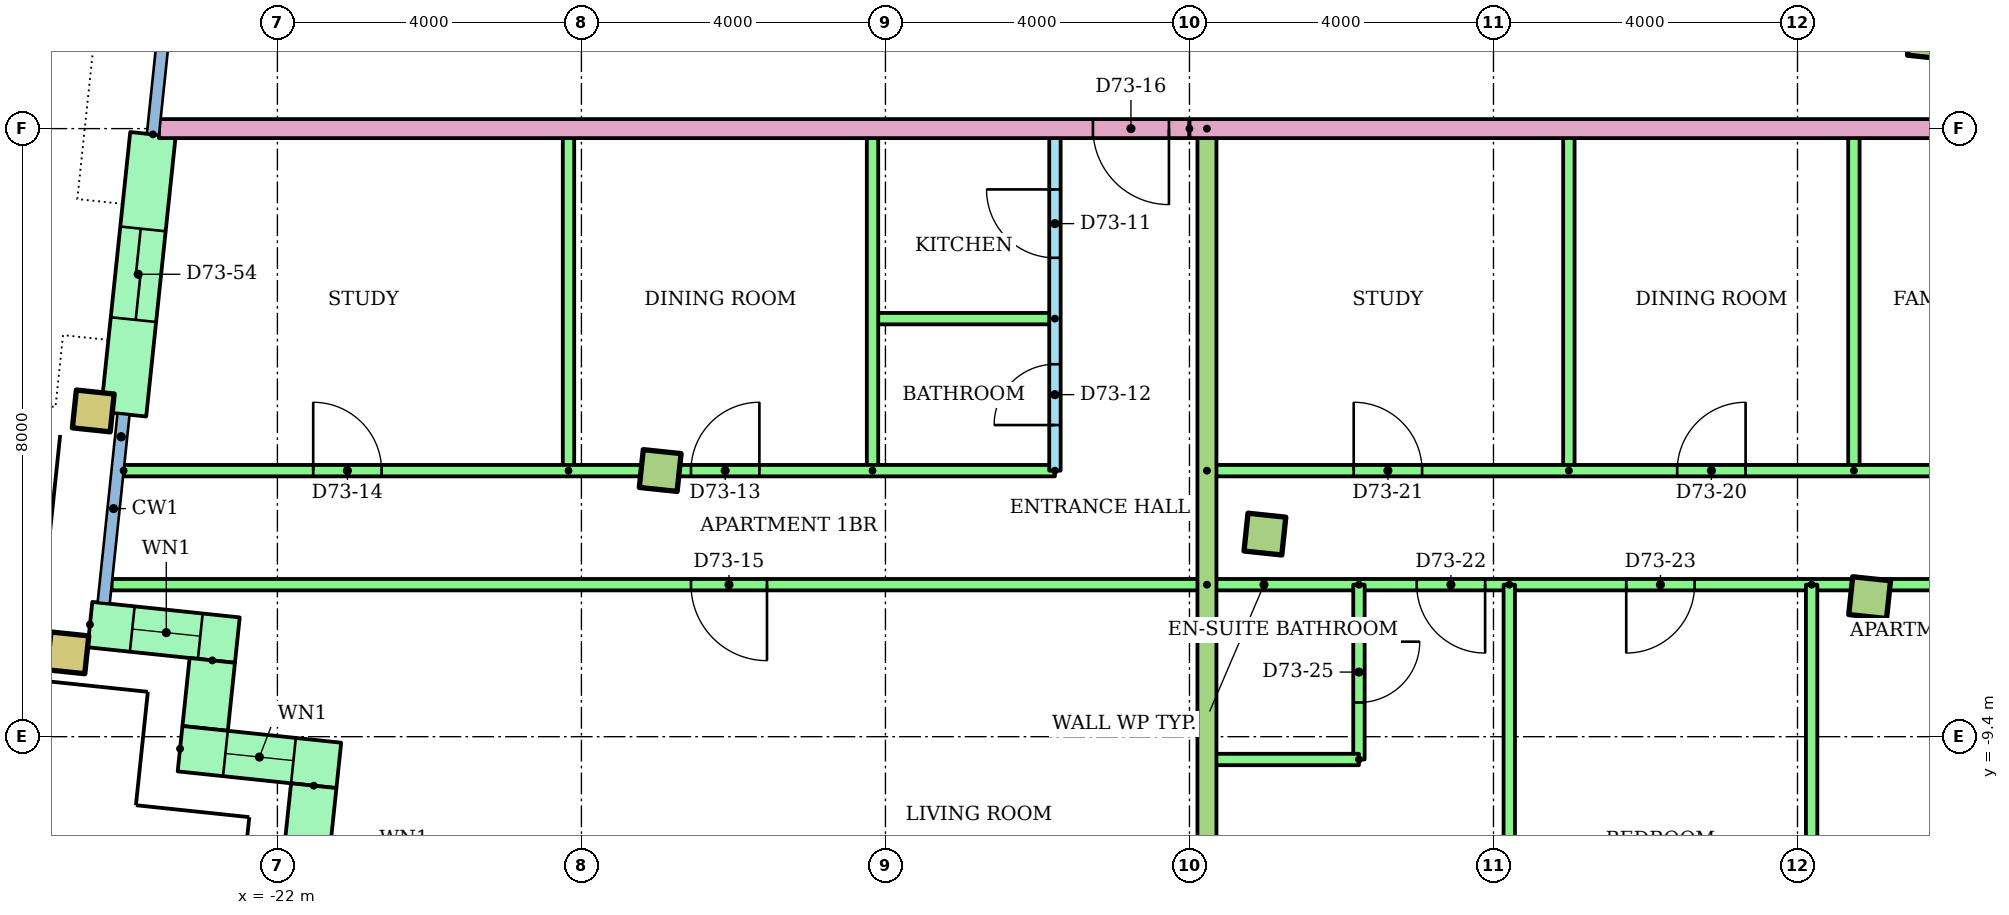
"""IFC4 building model, lengths in metres.
Left out: names, types, materials, properties, quantities, classifications, styles, units other than length and angle.
Written with IfcOpenShell. Run it as: python <this file> out.ifc"""

import sys

from ifc_helpers import new_model, si_unit, direction, frame, frame_2d, origin, origin_2d, place, context, subcontext, project, spatial, rectangle, hollow_rectangle, extrude, element, fill, save


model = new_model("IFC4")
c1 = context("Model", 3, precision=1e-05, world=origin(), true_north=direction((0.0, 1.0)))
c2 = subcontext(c1, "Body", "Model", "MODEL_VIEW")
j1 = project(units=[si_unit("LENGTHUNIT", "METRE"), si_unit("PLANEANGLEUNIT", "RADIAN")], contexts=[c1])
p1 = place(None, origin())
s1 = spatial("IfcSite", under=j1, at=p1, CompositionType="ELEMENT")
p2 = place(p1, origin())
s2 = spatial("IfcBuilding", under=s1, at=p2, CompositionType="ELEMENT")
p3 = place(p2, frame((0.0, 0.0, 278.7)))
s3 = spatial("IfcBuildingStorey", under=s2, at=p3, CompositionType="ELEMENT", Elevation=278.7)
for number, where, z_axis, x_axis in (
    (1, (-24.757, -8.297, 0.0), (0.0, 0.0, 1.0), (0.995, -0.105, 0.0)),
    (2, (-24.423, -5.115, 0.0), (0.0, 0.0, 1.0), (0.995, -0.105, 0.0)),
):
    element("IfcColumn", number, at=place(p3, frame(where, z_axis=z_axis, x_axis=x_axis)), inside=s3, PredefinedType="COLUMN", context=c2, shape_type="SweptSolid", body=[
        extrude(hollow_rectangle(XDim=0.5, YDim=0.5, WallThickness=0.025, at=origin_2d()), origin(), (0.0, 0.0, 1.0), 3.2),
    ])
for number, where, z_axis, x_axis in (
    (3, (-16.964, -5.898, 0.0), (0.0, 0.0, 1.0), (0.995, -0.105, 0.0)),
    (4, (-9.007, -6.735, 0.0), (0.0, 0.0, 1.0), (0.995, -0.105, 0.0)),
    (5, (-1.051, -7.571, 0.0), (0.0, 0.0, 1.0), (0.995, -0.105, 0.0)),
    (6, (-0.278, -0.211, 0.0), (0.0, 0.0, 1.0), (0.995, -0.105, 0.0)),
):
    element("IfcColumn", number, at=place(p3, frame(where, z_axis=z_axis, x_axis=x_axis)), inside=s3, PredefinedType="COLUMN", context=c2, shape_type="SweptSolid", body=[
        extrude(rectangle(XDim=0.5, YDim=0.5, at=origin_2d()), origin(), (0.0, 0.0, 1.0), 3.2),
    ])
p4 = place(p3, frame((-23.638, -1.476, 0.0), z_axis=(0.0, 0.0, 1.0), x_axis=(-0.104513052986, -0.994523514933, 0.0)))
e7 = element("IfcWall", 7, at=p4, inside=s3, PredefinedType="STANDARD", context=c2, shape_type="SweptSolid", body=[
    extrude(rectangle(XDim=3.7, YDim=0.6, at=frame_2d((1.85, 0.0))), origin(), (0.0, 0.0, 1.0), 2.8),
])
p5 = place(p4, frame((1.25, 0.0, 0.0)))
e8 = element("IfcOpeningElement", 8, at=p5, cuts=e7, PredefinedType="OPENING", context=c2, shape_type="SweptSolid", body=[
    extrude(rectangle(XDim=1.2, YDim=2.1, at=frame_2d((0.6, 1.05))), frame((0.0, 0.31, 0.0), z_axis=(0.0, -1.0, 0.0), x_axis=(1.0, 0.0, 0.0)), (0.0, 0.0, 1.0), 0.62),
])
p6 = place(p3, frame((-24.467, -7.925, 0.0), z_axis=(0.0, 0.0, 1.0), x_axis=(0.994521219184, -0.104534896528, 0.0)))
e9 = element("IfcWall", 9, at=p6, inside=s3, PredefinedType="STANDARD", context=c2, shape_type="SweptSolid", body=[
    extrude(rectangle(XDim=1.95, YDim=0.6, at=frame_2d((0.975, 0.0))), origin(), (0.0, 0.0, 1.0), 2.8),
])
p7 = place(p6, frame((0.56, 0.0, 0.9)))
e10 = element("IfcOpeningElement", 10, at=p7, cuts=e9, PredefinedType="OPENING", context=c2, shape_type="SweptSolid", body=[
    extrude(rectangle(XDim=0.9, YDim=1.5, at=frame_2d((0.45, 0.75))), frame((0.0, 0.31, 0.0), z_axis=(0.0, -1.0, 0.0), x_axis=(1.0, 0.0, 0.0)), (0.0, 0.0, 1.0), 0.62),
])
p8 = place(p3, frame((-22.857, -8.396, 0.0), z_axis=(0.0, 0.0, 1.0), x_axis=(-0.104444712852, -0.994530694326, 0.0)))
e11 = element("IfcWall", 11, at=p8, inside=s3, PredefinedType="STANDARD", context=c2, shape_type="SweptSolid", body=[
    extrude(rectangle(XDim=0.9, YDim=0.6, at=frame_2d((0.45, 0.0))), origin(), (0.0, 0.0, 1.0), 2.8),
])
p9 = place(p3, frame((-23.281, -9.558, 0.0), z_axis=(0.0, 0.0, 1.0), x_axis=(0.994523910136, -0.104509292252, 0.0)))
e12 = element("IfcWall", 12, at=p9, inside=s3, PredefinedType="STANDARD", context=c2, shape_type="SweptSolid", body=[
    extrude(rectangle(XDim=2.1, YDim=0.6, at=frame_2d((1.05, 0.0))), origin(), (0.0, 0.0, 1.0), 2.8),
])
p10 = place(p9, frame((0.6, 0.0, 0.9)))
e13 = element("IfcOpeningElement", 13, at=p10, cuts=e12, PredefinedType="OPENING", context=c2, shape_type="SweptSolid", body=[
    extrude(rectangle(XDim=0.9, YDim=1.5, at=frame_2d((0.45, 0.75))), frame((0.0, 0.31, 0.0), z_axis=(0.0, -1.0, 0.0), x_axis=(1.0, 0.0, 0.0)), (0.0, 0.0, 1.0), 0.62),
])
p11 = place(p3, frame((-21.522, -10.044, 0.0), z_axis=(0.0, 0.0, 1.0), x_axis=(-0.104416541099, -0.994533652495, 0.0)))
e14 = element("IfcWall", 14, at=p11, inside=s3, PredefinedType="STANDARD", context=c2, shape_type="SweptSolid", body=[
    extrude(rectangle(XDim=0.9, YDim=0.6, at=frame_2d((0.45, 0.0))), origin(), (0.0, 0.0, 1.0), 2.8),
])
p12 = place(p3, frame((-11.77, -5.9, 0.0), z_axis=(0.0, 0.0, 1.0), x_axis=(0.0, 1.0, 0.0)))
e15 = element("IfcWall", 15, at=p12, inside=s3, PredefinedType="PARTITIONING", context=c2, shape_type="SweptSolid", body=[
    extrude(rectangle(XDim=4.5, YDim=0.15, at=frame_2d((2.25, 0.0))), origin(), (0.0, 0.0, 1.0), 2.4),
])
p13 = place(p12, frame((2.8, 0.0, 0.0)))
e16 = element("IfcOpeningElement", 16, at=p13, cuts=e15, PredefinedType="OPENING", context=c2, shape_type="SweptSolid", body=[
    extrude(rectangle(XDim=0.9, YDim=2.1, at=frame_2d((0.45, 1.05))), frame((0.0, 0.085, 0.0), z_axis=(0.0, -1.0, 0.0), x_axis=(1.0, 0.0, 0.0)), (0.0, 0.0, 1.0), 0.17),
])
p14 = place(p12, frame((0.6, 0.0, 0.0)))
e17 = element("IfcOpeningElement", 17, at=p14, cuts=e15, PredefinedType="OPENING", context=c2, shape_type="SweptSolid", body=[
    extrude(rectangle(XDim=0.8, YDim=2.1, at=frame_2d((0.4, 1.05))), frame((0.0, 0.085, 0.0), z_axis=(0.0, -1.0, 0.0), x_axis=(1.0, 0.0, 0.0)), (0.0, 0.0, 1.0), 0.17),
])
p15 = place(p3, frame((-11.77, -3.9, 0.0), z_axis=(0.0, 0.0, 1.0), x_axis=(-1.0, 0.0, 0.0)))
e18 = element("IfcWall", 18, at=p15, inside=s3, PredefinedType="PARTITIONING", context=c2, shape_type="SweptSolid", body=[
    extrude(rectangle(XDim=2.4, YDim=0.15, at=frame_2d((1.2, 0.0))), origin(), (0.0, 0.0, 1.0), 2.4),
])
for number, where, z_axis, x_axis in (
    (19, (-14.17, -5.9, 0.0), (0.0, 0.0, 1.0), (0.0, 1.0, 0.0)),
    (20, (-18.17, -5.9, 0.0), (0.0, 0.0, 1.0), (0.0, 1.0, 0.0)),
):
    element("IfcWall", number, at=place(p3, frame(where, z_axis=z_axis, x_axis=x_axis)), inside=s3, PredefinedType="PARTITIONING", context=c2, shape_type="SweptSolid", body=[
        extrude(rectangle(XDim=4.5, YDim=0.15, at=frame_2d((2.25, 0.0))), origin(), (0.0, 0.0, 1.0), 2.4),
    ])
p16 = place(p3, frame((-24.023, -5.9, 0.0)))
e21 = element("IfcWall", 21, at=p16, inside=s3, PredefinedType="PARTITIONING", context=c2, shape_type="SweptSolid", body=[
    extrude(rectangle(XDim=12.253, YDim=0.15, at=frame_2d((6.127, 0.0))), origin(), (0.0, 0.0, 1.0), 2.4),
])
p17 = place(p16, frame((7.465, 0.0, 0.0)))
e22 = element("IfcOpeningElement", 22, at=p17, cuts=e21, PredefinedType="OPENING", context=c2, shape_type="SweptSolid", body=[
    extrude(rectangle(XDim=0.9, YDim=2.1, at=frame_2d((0.45, 1.05))), frame((0.0, 0.085, 0.0), z_axis=(0.0, -1.0, 0.0), x_axis=(1.0, 0.0, 0.0)), (0.0, 0.0, 1.0), 0.17),
])
p18 = place(p16, frame((2.494, 0.0, 0.0)))
e23 = element("IfcOpeningElement", 23, at=p18, cuts=e21, PredefinedType="OPENING", context=c2, shape_type="SweptSolid", body=[
    extrude(rectangle(XDim=0.9, YDim=2.1, at=frame_2d((0.45, 1.05))), frame((0.0, 0.085, 0.0), z_axis=(0.0, -1.0, 0.0), x_axis=(1.0, 0.0, 0.0)), (0.0, 0.0, 1.0), 0.17),
])
p19 = place(p3, frame((-9.77, -7.4, 0.0), z_axis=(0.0, 0.0, 1.0), x_axis=(-1.0, 0.0, 0.0)))
e24 = element("IfcWall", 24, at=p19, inside=s3, PredefinedType="PARTITIONING", context=c2, shape_type="SweptSolid", body=[
    extrude(rectangle(XDim=14.411, YDim=0.15, at=frame_2d((7.206, 0.0))), origin(), (0.0, 0.0, 1.0), 2.4),
])
p20 = place(p19, frame((5.789, 0.0, 0.0)))
e25 = element("IfcOpeningElement", 25, at=p20, cuts=e24, PredefinedType="OPENING", context=c2, shape_type="SweptSolid", body=[
    extrude(rectangle(XDim=1.0, YDim=2.1, at=frame_2d((0.5, 1.05))), frame((0.0, 0.085, 0.0), z_axis=(0.0, -1.0, 0.0), x_axis=(1.0, 0.0, 0.0)), (0.0, 0.0, 1.0), 0.17),
])
for number, where, z_axis, x_axis in (
    (26, (-1.258, -5.9, 0.0), (0.0, 0.0, 1.0), (0.0, 1.0, 0.0)),
    (27, (-5.008, -5.9, 0.0), (0.0, 0.0, 1.0), (0.0, 1.0, 0.0)),
):
    element("IfcWall", number, at=place(p3, frame(where, z_axis=z_axis, x_axis=x_axis)), inside=s3, PredefinedType="PARTITIONING", context=c2, shape_type="SweptSolid", body=[
        extrude(rectangle(XDim=4.5, YDim=0.15, at=frame_2d((2.25, 0.0))), origin(), (0.0, 0.0, 1.0), 2.4),
    ])
p21 = place(p3, frame((-9.77, -5.9, 0.0)))
e28 = element("IfcWall", 28, at=p21, inside=s3, PredefinedType="PARTITIONING", context=c2, shape_type="SweptSolid", body=[
    extrude(rectangle(XDim=13.912, YDim=0.15, at=frame_2d((6.956, 0.0))), origin(), (0.0, 0.0, 1.0), 2.4),
])
p22 = place(p21, frame((9.562, 0.0, 0.0)))
e29 = element("IfcOpeningElement", 29, at=p22, cuts=e28, PredefinedType="OPENING", context=c2, shape_type="SweptSolid", body=[
    extrude(rectangle(XDim=0.9, YDim=2.1, at=frame_2d((0.45, 1.05))), frame((0.0, 0.085, 0.0), z_axis=(0.0, -1.0, 0.0), x_axis=(1.0, 0.0, 0.0)), (0.0, 0.0, 1.0), 0.17),
])
p23 = place(p21, frame((6.187, 0.0, 0.0)))
e30 = element("IfcOpeningElement", 30, at=p23, cuts=e28, PredefinedType="OPENING", context=c2, shape_type="SweptSolid", body=[
    extrude(rectangle(XDim=0.9, YDim=2.1, at=frame_2d((0.45, 1.05))), frame((0.0, 0.085, 0.0), z_axis=(0.0, -1.0, 0.0), x_axis=(1.0, 0.0, 0.0)), (0.0, 0.0, 1.0), 0.17),
])
p24 = place(p21, frame((1.931, 0.0, 0.0)))
e31 = element("IfcOpeningElement", 31, at=p24, cuts=e28, PredefinedType="OPENING", context=c2, shape_type="SweptSolid", body=[
    extrude(rectangle(XDim=0.9, YDim=2.1, at=frame_2d((0.45, 1.05))), frame((0.0, 0.085, 0.0), z_axis=(0.0, -1.0, 0.0), x_axis=(1.0, 0.0, 0.0)), (0.0, 0.0, 1.0), 0.17),
])
p25 = place(p3, frame((6.142, -7.4, 0.0), z_axis=(0.0, 0.0, 1.0), x_axis=(-1.0, 0.0, 0.0)))
e32 = element("IfcWall", 32, at=p25, inside=s3, PredefinedType="PARTITIONING", context=c2, shape_type="SweptSolid", body=[
    extrude(rectangle(XDim=15.912, YDim=0.15, at=frame_2d((7.956, 0.0))), origin(), (0.0, 0.0, 1.0), 2.4),
])
p26 = place(p25, frame((12.252, 0.0, 0.0)))
e33 = element("IfcOpeningElement", 33, at=p26, cuts=e32, PredefinedType="OPENING", context=c2, shape_type="SweptSolid", body=[
    extrude(rectangle(XDim=0.9, YDim=2.1, at=frame_2d((0.45, 1.05))), frame((0.0, 0.085, 0.0), z_axis=(0.0, -1.0, 0.0), x_axis=(1.0, 0.0, 0.0)), (0.0, 0.0, 1.0), 0.17),
])
p27 = place(p25, frame((9.495, 0.0, 0.0)))
e34 = element("IfcOpeningElement", 34, at=p27, cuts=e32, PredefinedType="OPENING", context=c2, shape_type="SweptSolid", body=[
    extrude(rectangle(XDim=0.9, YDim=2.1, at=frame_2d((0.45, 1.05))), frame((0.0, 0.085, 0.0), z_axis=(0.0, -1.0, 0.0), x_axis=(1.0, 0.0, 0.0)), (0.0, 0.0, 1.0), 0.17),
])
p28 = place(p25, frame((3.478, 0.0, 0.0)))
e35 = element("IfcOpeningElement", 35, at=p28, cuts=e32, PredefinedType="OPENING", context=c2, shape_type="SweptSolid", body=[
    extrude(rectangle(XDim=1.0, YDim=2.1, at=frame_2d((0.5, 1.05))), frame((0.0, 0.085, 0.0), z_axis=(0.0, -1.0, 0.0), x_axis=(1.0, 0.0, 0.0)), (0.0, 0.0, 1.0), 0.17),
])
p29 = place(p3, frame((-5.792, -7.4, 0.0), z_axis=(0.0, 0.0, 1.0), x_axis=(0.0, -1.0, 0.0)))
e36 = element("IfcWall", 36, at=p29, inside=s3, PredefinedType="PARTITIONING", context=c2, shape_type="SweptSolid", body=[
    extrude(rectangle(XDim=6.933, YDim=0.15, at=frame_2d((3.467, 0.0))), origin(), (0.0, 0.0, 1.0), 2.4),
])
p30 = place(p3, frame((-1.814, -7.4, 0.0), z_axis=(0.0, 0.0, 1.0), x_axis=(0.0, -1.0, 0.0)))
e37 = element("IfcWall", 37, at=p30, inside=s3, PredefinedType="PARTITIONING", context=c2, shape_type="SweptSolid", body=[
    extrude(rectangle(XDim=7.341, YDim=0.15, at=frame_2d((3.67, 0.0))), origin(), (0.0, 0.0, 1.0), 2.4),
])
p31 = place(p3, frame((-7.77, -7.4, 0.0), z_axis=(0.0, 0.0, 1.0), x_axis=(0.0, -1.0, 0.0)))
e38 = element("IfcWall", 38, at=p31, inside=s3, PredefinedType="PARTITIONING", context=c2, shape_type="SweptSolid", body=[
    extrude(rectangle(XDim=2.3, YDim=0.15, at=frame_2d((1.15, 0.0))), origin(), (0.0, 0.0, 1.0), 2.4),
])
p32 = place(p31, frame((0.75, 0.0, 0.0)))
e39 = element("IfcOpeningElement", 39, at=p32, cuts=e38, PredefinedType="OPENING", context=c2, shape_type="SweptSolid", body=[
    extrude(rectangle(XDim=0.8, YDim=2.1, at=frame_2d((0.4, 1.05))), frame((0.0, 0.085, 0.0), z_axis=(0.0, -1.0, 0.0), x_axis=(1.0, 0.0, 0.0)), (0.0, 0.0, 1.0), 0.17),
])
p33 = place(p3, frame((-7.77, -9.7, 0.0), z_axis=(0.0, 0.0, 1.0), x_axis=(-1.0, 0.0, 0.0)))
e40 = element("IfcWall", 40, at=p33, inside=s3, PredefinedType="PARTITIONING", context=c2, shape_type="SweptSolid", body=[
    extrude(rectangle(XDim=2.0, YDim=0.15, at=frame_2d((1.0, 0.0))), origin(), (0.0, 0.0, 1.0), 2.4),
])
p34 = place(p3, frame((-9.77, -1.4, 0.0), z_axis=(0.0, 0.0, 1.0), x_axis=(0.0, -1.0, 0.0)))
e41 = element("IfcWall", 41, at=p34, inside=s3, PredefinedType="PARTITIONING", context=c2, shape_type="SweptSolid", body=[
    extrude(rectangle(XDim=12.504, YDim=0.25, at=frame_2d((6.252, 0.0))), origin(), (0.0, 0.0, 1.0), 2.4),
])
p35 = place(p3, frame((-10.0, -1.4, 0.0), z_axis=(0.0, 0.0, 1.0), x_axis=(-1.0, 0.0, 0.0)))
e42 = element("IfcWall", 42, at=p35, inside=s3, PredefinedType="PARTITIONING", context=c2, shape_type="SweptSolid", body=[
    extrude(rectangle(XDim=13.56, YDim=0.25, at=frame_2d((6.78, 0.0))), origin(), (0.0, 0.0, 1.0), 2.4),
])
p36 = place(p35, frame((0.27, 0.0, 0.0)))
e43 = element("IfcOpeningElement", 43, at=p36, cuts=e42, PredefinedType="OPENING", context=c2, shape_type="SweptSolid", body=[
    extrude(rectangle(XDim=1.0, YDim=2.1, at=frame_2d((0.5, 1.05))), frame((0.0, 0.135, 0.0), z_axis=(0.0, -1.0, 0.0), x_axis=(1.0, 0.0, 0.0)), (0.0, 0.0, 1.0), 0.27),
])
p37 = place(p3, frame((10.0, -1.4, 0.0), z_axis=(0.0, 0.0, 1.0), x_axis=(-1.0, 0.0, 0.0)))
e44 = element("IfcWall", 44, at=p37, inside=s3, PredefinedType="PARTITIONING", context=c2, shape_type="SweptSolid", body=[
    extrude(rectangle(XDim=20.0, YDim=0.25, at=frame_2d((10.0, 0.0))), origin(), (0.0, 0.0, 1.0), 2.4),
])
p38 = place(p37, frame((4.358, 0.0, 0.0)))
e45 = element("IfcOpeningElement", 45, at=p38, cuts=e44, PredefinedType="OPENING", context=c2, shape_type="SweptSolid", body=[
    extrude(rectangle(XDim=1.0, YDim=2.1, at=frame_2d((0.5, 1.05))), frame((0.0, 0.135, 0.0), z_axis=(0.0, -1.0, 0.0), x_axis=(1.0, 0.0, 0.0)), (0.0, 0.0, 1.0), 0.27),
])
p39 = place(p37, frame((2.614, 0.0, 0.0)))
e46 = element("IfcOpeningElement", 46, at=p39, cuts=e44, PredefinedType="OPENING", context=c2, shape_type="SweptSolid", body=[
    extrude(rectangle(XDim=0.9, YDim=2.1, at=frame_2d((0.45, 1.05))), frame((0.0, 0.135, 0.0), z_axis=(0.0, -1.0, 0.0), x_axis=(1.0, 0.0, 0.0)), (0.0, 0.0, 1.0), 0.27),
])
p40 = place(p7, origin())
e47 = element("IfcWindow", 47, at=p40, inside=s3, PartitioningType="SINGLE_PANEL", PredefinedType="WINDOW", context=c2, shape_type="SweptSolid", body=[
    extrude(rectangle(XDim=0.9, YDim=1.5, at=frame_2d((0.45, 0.75))), frame((0.0, 0.03, 0.0), z_axis=(0.0, -1.0, 0.0), x_axis=(1.0, 0.0, 0.0)), (0.0, 0.0, 1.0), 0.06),
])
fill(e10, e47)
p41 = place(p10, origin())
e48 = element("IfcWindow", 48, at=p41, inside=s3, PartitioningType="SINGLE_PANEL", PredefinedType="WINDOW", context=c2, shape_type="SweptSolid", body=[
    extrude(rectangle(XDim=0.9, YDim=1.5, at=frame_2d((0.45, 0.75))), frame((0.0, 0.03, 0.0), z_axis=(0.0, -1.0, 0.0), x_axis=(1.0, 0.0, 0.0)), (0.0, 0.0, 1.0), 0.06),
])
fill(e13, e48)
p42 = place(p13, origin())
e49 = element("IfcDoor", 49, at=p42, inside=s3, OperationType="SINGLE_SWING_RIGHT", PredefinedType="DOOR", context=c2, shape_type="SweptSolid", body=[
    extrude(rectangle(XDim=0.9, YDim=2.1, at=frame_2d((0.45, 1.05))), frame((0.0, 0.025, 0.0), z_axis=(0.0, -1.0, 0.0), x_axis=(1.0, 0.0, 0.0)), (0.0, 0.0, 1.0), 0.05),
])
fill(e16, e49)
p43 = place(p14, origin())
e50 = element("IfcDoor", 50, at=p43, inside=s3, OperationType="SINGLE_SWING_LEFT", PredefinedType="DOOR", context=c2, shape_type="SweptSolid", body=[
    extrude(rectangle(XDim=0.8, YDim=2.1, at=frame_2d((0.4, 1.05))), frame((0.0, 0.025, 0.0), z_axis=(0.0, -1.0, 0.0), x_axis=(1.0, 0.0, 0.0)), (0.0, 0.0, 1.0), 0.05),
])
fill(e17, e50)
p44 = place(p17, origin())
e51 = element("IfcDoor", 51, at=p44, inside=s3, OperationType="SINGLE_SWING_RIGHT", PredefinedType="DOOR", context=c2, shape_type="SweptSolid", body=[
    extrude(rectangle(XDim=0.9, YDim=2.1, at=frame_2d((0.45, 1.05))), frame((0.0, 0.025, 0.0), z_axis=(0.0, -1.0, 0.0), x_axis=(1.0, 0.0, 0.0)), (0.0, 0.0, 1.0), 0.05),
])
fill(e22, e51)
p45 = place(p18, origin())
e52 = element("IfcDoor", 52, at=p45, inside=s3, OperationType="SINGLE_SWING_LEFT", PredefinedType="DOOR", context=c2, shape_type="SweptSolid", body=[
    extrude(rectangle(XDim=0.9, YDim=2.1, at=frame_2d((0.45, 1.05))), frame((0.0, 0.025, 0.0), z_axis=(0.0, -1.0, 0.0), x_axis=(1.0, 0.0, 0.0)), (0.0, 0.0, 1.0), 0.05),
])
fill(e23, e52)
p46 = place(p20, origin())
e53 = element("IfcDoor", 53, at=p46, inside=s3, OperationType="SINGLE_SWING_LEFT", PredefinedType="DOOR", context=c2, shape_type="SweptSolid", body=[
    extrude(rectangle(XDim=1.0, YDim=2.1, at=frame_2d((0.5, 1.05))), frame((0.0, 0.025, 0.0), z_axis=(0.0, -1.0, 0.0), x_axis=(1.0, 0.0, 0.0)), (0.0, 0.0, 1.0), 0.05),
])
fill(e25, e53)
p47 = place(p36, origin())
e54 = element("IfcDoor", 54, at=p47, inside=s3, OperationType="SINGLE_SWING_LEFT", PredefinedType="DOOR", context=c2, shape_type="SweptSolid", body=[
    extrude(rectangle(XDim=1.0, YDim=2.1, at=frame_2d((0.5, 1.05))), frame((0.0, 0.025, 0.0), z_axis=(0.0, -1.0, 0.0), x_axis=(1.0, 0.0, 0.0)), (0.0, 0.0, 1.0), 0.05),
])
fill(e43, e54)
p48 = place(p23, origin())
e55 = element("IfcDoor", 55, at=p48, inside=s3, OperationType="SINGLE_SWING_RIGHT", PredefinedType="DOOR", context=c2, shape_type="SweptSolid", body=[
    extrude(rectangle(XDim=0.9, YDim=2.1, at=frame_2d((0.45, 1.05))), frame((0.0, 0.025, 0.0), z_axis=(0.0, -1.0, 0.0), x_axis=(1.0, 0.0, 0.0)), (0.0, 0.0, 1.0), 0.05),
])
fill(e30, e55)
p49 = place(p24, origin())
e56 = element("IfcDoor", 56, at=p49, inside=s3, OperationType="SINGLE_SWING_LEFT", PredefinedType="DOOR", context=c2, shape_type="SweptSolid", body=[
    extrude(rectangle(XDim=0.9, YDim=2.1, at=frame_2d((0.45, 1.05))), frame((0.0, 0.025, 0.0), z_axis=(0.0, -1.0, 0.0), x_axis=(1.0, 0.0, 0.0)), (0.0, 0.0, 1.0), 0.05),
])
fill(e31, e56)
p50 = place(p26, origin())
e57 = element("IfcDoor", 57, at=p50, inside=s3, OperationType="SINGLE_SWING_LEFT", PredefinedType="DOOR", context=c2, shape_type="SweptSolid", body=[
    extrude(rectangle(XDim=0.9, YDim=2.1, at=frame_2d((0.45, 1.05))), frame((0.0, 0.025, 0.0), z_axis=(0.0, -1.0, 0.0), x_axis=(1.0, 0.0, 0.0)), (0.0, 0.0, 1.0), 0.05),
])
fill(e33, e57)
p51 = place(p27, origin())
e58 = element("IfcDoor", 58, at=p51, inside=s3, OperationType="SINGLE_SWING_RIGHT", PredefinedType="DOOR", context=c2, shape_type="SweptSolid", body=[
    extrude(rectangle(XDim=0.9, YDim=2.1, at=frame_2d((0.45, 1.05))), frame((0.0, 0.025, 0.0), z_axis=(0.0, -1.0, 0.0), x_axis=(1.0, 0.0, 0.0)), (0.0, 0.0, 1.0), 0.05),
])
fill(e34, e58)
p52 = place(p32, origin())
e59 = element("IfcDoor", 59, at=p52, inside=s3, OperationType="SINGLE_SWING_LEFT", PredefinedType="DOOR", context=c2, shape_type="SweptSolid", body=[
    extrude(rectangle(XDim=0.8, YDim=2.1, at=frame_2d((0.4, 1.05))), frame((0.0, 0.025, 0.0), z_axis=(0.0, -1.0, 0.0), x_axis=(1.0, 0.0, 0.0)), (0.0, 0.0, 1.0), 0.05),
])
fill(e39, e59)
p53 = place(p5, origin())
e60 = element("IfcDoor", 60, at=p53, inside=s3, OperationType="SLIDING_TO_LEFT", PredefinedType="DOOR", context=c2, shape_type="SweptSolid", body=[
    extrude(rectangle(XDim=1.2, YDim=2.1, at=frame_2d((0.6, 1.05))), frame((0.0, 0.025, 0.0), z_axis=(0.0, -1.0, 0.0), x_axis=(1.0, 0.0, 0.0)), (0.0, 0.0, 1.0), 0.05),
])
fill(e8, e60)
save(model, sys.argv[1])
